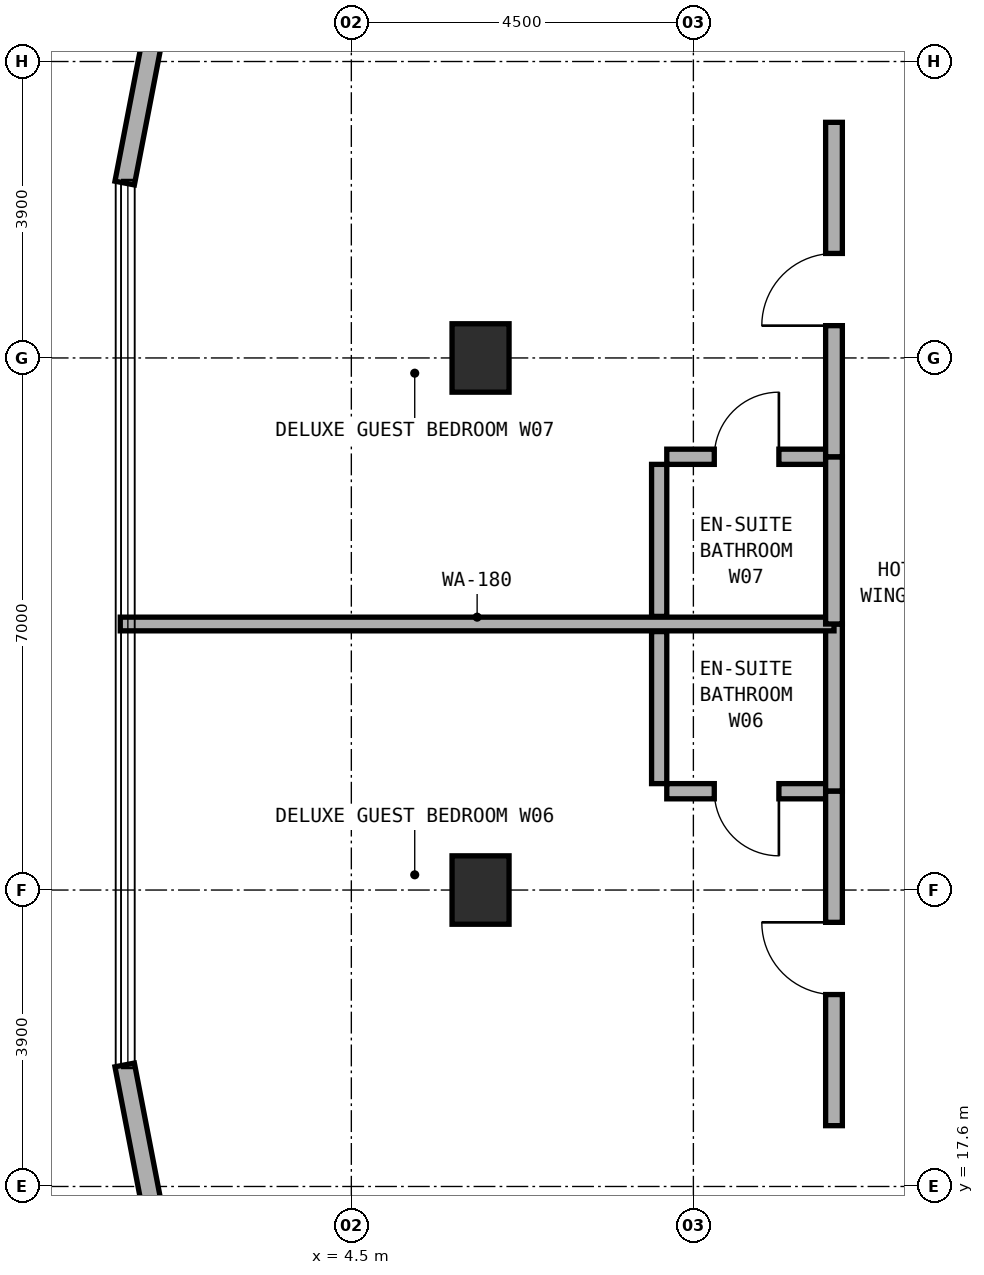
"""IFC4 building model, lengths in metres.
Left out: names, types, materials, properties, quantities, classifications, styles, units other than length and angle.
Written with IfcOpenShell. Run it as: python <this file> out.ifc"""

import sys

from ifc_helpers import new_model, si_unit, direction, frame, frame_2d, origin, origin_2d, place, context, subcontext, project, spatial, rectangle, extrude, element, fill, save


model = new_model("IFC4")
c1 = context("Model", 3, precision=1e-05, world=origin(), true_north=direction((0.0, 1.0)))
c2 = subcontext(c1, "Body", "Model", "MODEL_VIEW")
j1 = project(units=[si_unit("LENGTHUNIT", "METRE"), si_unit("PLANEANGLEUNIT", "RADIAN")], contexts=[c1])
p1 = place(None, origin())
s1 = spatial("IfcSite", under=j1, at=p1, CompositionType="ELEMENT")
p2 = place(p1, origin())
s2 = spatial("IfcBuilding", under=s1, at=p2, CompositionType="ELEMENT")
p3 = place(p2, frame((0.0, 0.0, 191.9)))
s3 = spatial("IfcBuildingStorey", under=s2, at=p3, CompositionType="ELEMENT", Elevation=191.9)
for number, where, z_axis, x_axis in (
    (1, (6.2, 21.5, 0.0), (0.0, 0.0, 1.0), (1.0, 0.0, 0.0)),
    (2, (6.2, 28.5, 0.0), (0.0, 0.0, 1.0), (1.0, 0.0, 0.0)),
):
    element("IfcColumn", number, at=place(p3, frame(where, z_axis=z_axis, x_axis=x_axis)), inside=s3, PredefinedType="COLUMN", context=c2, shape_type="SweptSolid", body=[
        extrude(rectangle(XDim=0.75, YDim=0.9, at=origin_2d()), origin(), (0.0, 0.0, 1.0), 3.6),
    ])
p4 = place(p3, frame((3.23, 39.683, 0.0), z_axis=(0.0, 0.0, 1.0), x_axis=(-0.189254809039, -0.98192801022, 0.0)))
e3 = element("IfcWall", 3, at=p4, inside=s3, PredefinedType="STANDARD", context=c2, shape_type="SweptSolid", body=[
    extrude(rectangle(XDim=9.046, YDim=0.26, at=frame_2d((4.523, 0.0))), origin(), (0.0, 0.0, 1.0), 3.32),
])
p5 = place(p4, frame((4.212, 0.0, 0.85)))
e4 = element("IfcOpeningElement", 4, at=p5, cuts=e3, PredefinedType="OPENING", context=c2, shape_type="SweptSolid", body=[
    extrude(rectangle(XDim=2.1, YDim=1.5, at=frame_2d((1.05, 0.75))), frame((0.0, 0.14, 0.0), z_axis=(0.0, -1.0, 0.0), x_axis=(1.0, 0.0, 0.0)), (0.0, 0.0, 1.0), 0.28),
])
p6 = place(p3, frame((1.518, 19.199, 0.0), z_axis=(0.0, 0.0, 1.0), x_axis=(0.189254809039, -0.98192801022, 0.0)))
e5 = element("IfcWall", 5, at=p6, inside=s3, PredefinedType="STANDARD", context=c2, shape_type="SweptSolid", body=[
    extrude(rectangle(XDim=9.046, YDim=0.26, at=frame_2d((4.523, 0.0))), origin(), (0.0, 0.0, 1.0), 3.32),
])
p7 = place(p6, frame((2.733, 0.0, 0.85)))
e6 = element("IfcOpeningElement", 6, at=p7, cuts=e5, PredefinedType="OPENING", context=c2, shape_type="SweptSolid", body=[
    extrude(rectangle(XDim=2.1, YDim=1.5, at=frame_2d((1.05, 0.75))), frame((0.0, 0.14, 0.0), z_axis=(0.0, -1.0, 0.0), x_axis=(1.0, 0.0, 0.0)), (0.0, 0.0, 1.0), 0.28),
])
p8 = place(p3, frame((8.65, 22.8, 0.0), z_axis=(0.0, 0.0, 1.0), x_axis=(1.0, 0.0, 0.0)))
e7 = element("IfcWall", 7, at=p8, inside=s3, PredefinedType="PLUMBINGWALL", context=c2, shape_type="SweptSolid", body=[
    extrude(rectangle(XDim=2.1, YDim=0.2, at=frame_2d((1.05, 0.0))), origin(), (0.0, 0.0, 1.0), 3.32),
])
p9 = place(p8, frame((0.625, 0.0, 0.0)))
e8 = element("IfcOpeningElement", 8, at=p9, cuts=e7, PredefinedType="OPENING", context=c2, shape_type="SweptSolid", body=[
    extrude(rectangle(XDim=0.85, YDim=2.1, at=frame_2d((0.425, 1.05))), frame((0.0, 0.11, 0.0), z_axis=(0.0, -1.0, 0.0), x_axis=(1.0, 0.0, 0.0)), (0.0, 0.0, 1.0), 0.22),
])
p10 = place(p3, frame((8.55, 22.9, 0.0), z_axis=(0.0, 0.0, 1.0), x_axis=(0.0, 1.0, 0.0)))
e9 = element("IfcWall", 9, at=p10, inside=s3, PredefinedType="PLUMBINGWALL", context=c2, shape_type="SweptSolid", body=[
    extrude(rectangle(XDim=2.0, YDim=0.2, at=frame_2d((1.0, 0.0))), origin(), (0.0, 0.0, 1.0), 3.32),
])
p11 = place(p3, frame((10.85, 22.8, 0.0), z_axis=(0.0, 0.0, 1.0), x_axis=(0.0, 1.0, 0.0)))
e10 = element("IfcWall", 10, at=p11, inside=s3, PredefinedType="SOLIDWALL", context=c2, shape_type="SweptSolid", body=[
    extrude(rectangle(XDim=2.2, YDim=0.22, at=frame_2d((1.1, 0.0))), origin(), (0.0, 0.0, 1.0), 3.32),
])
p12 = place(p3, frame((10.85, 18.4, 0.0), z_axis=(0.0, 0.0, 1.0), x_axis=(0.0, 1.0, 0.0)))
e11 = element("IfcWall", 11, at=p12, inside=s3, PredefinedType="SOLIDWALL", context=c2, shape_type="SweptSolid", body=[
    extrude(rectangle(XDim=4.4, YDim=0.22, at=frame_2d((2.2, 0.0))), origin(), (0.0, 0.0, 1.0), 2.995),
])
p13 = place(p12, frame((1.725, 0.0, 0.0)))
e12 = element("IfcOpeningElement", 12, at=p13, cuts=e11, PredefinedType="OPENING", context=c2, shape_type="SweptSolid", body=[
    extrude(rectangle(XDim=0.95, YDim=2.1, at=frame_2d((0.475, 1.05))), frame((0.0, 0.12, 0.0), z_axis=(0.0, -1.0, 0.0), x_axis=(1.0, 0.0, 0.0)), (0.0, 0.0, 1.0), 0.24),
])
p14 = place(p3, frame((1.46, 25.0, 0.0), z_axis=(0.0, 0.0, 1.0), x_axis=(1.0, 0.0, 0.0)))
e13 = element("IfcWall", 13, at=p14, inside=s3, PredefinedType="SOLIDWALL", context=c2, shape_type="SweptSolid", body=[
    extrude(rectangle(XDim=9.39, YDim=0.18, at=frame_2d((4.695, 0.0))), origin(), (0.0, 0.0, 1.0), 2.935),
])
p15 = place(p3, frame((8.65, 27.2, 0.0), z_axis=(0.0, 0.0, 1.0), x_axis=(1.0, 0.0, 0.0)))
e14 = element("IfcWall", 14, at=p15, inside=s3, PredefinedType="PLUMBINGWALL", context=c2, shape_type="SweptSolid", body=[
    extrude(rectangle(XDim=2.1, YDim=0.2, at=frame_2d((1.05, 0.0))), origin(), (0.0, 0.0, 1.0), 3.32),
])
p16 = place(p15, frame((0.625, 0.0, 0.0)))
e15 = element("IfcOpeningElement", 15, at=p16, cuts=e14, PredefinedType="OPENING", context=c2, shape_type="SweptSolid", body=[
    extrude(rectangle(XDim=0.85, YDim=2.1, at=frame_2d((0.425, 1.05))), frame((0.0, 0.11, 0.0), z_axis=(0.0, -1.0, 0.0), x_axis=(1.0, 0.0, 0.0)), (0.0, 0.0, 1.0), 0.22),
])
p17 = place(p3, frame((8.55, 25.1, 0.0), z_axis=(0.0, 0.0, 1.0), x_axis=(0.0, 1.0, 0.0)))
e16 = element("IfcWall", 16, at=p17, inside=s3, PredefinedType="PLUMBINGWALL", context=c2, shape_type="SweptSolid", body=[
    extrude(rectangle(XDim=2.0, YDim=0.2, at=frame_2d((1.0, 0.0))), origin(), (0.0, 0.0, 1.0), 3.32),
])
p18 = place(p3, frame((10.85, 25.0, 0.0), z_axis=(0.0, 0.0, 1.0), x_axis=(0.0, 1.0, 0.0)))
e17 = element("IfcWall", 17, at=p18, inside=s3, PredefinedType="SOLIDWALL", context=c2, shape_type="SweptSolid", body=[
    extrude(rectangle(XDim=2.2, YDim=0.22, at=frame_2d((1.1, 0.0))), origin(), (0.0, 0.0, 1.0), 3.32),
])
p19 = place(p3, frame((10.85, 27.2, 0.0), z_axis=(0.0, 0.0, 1.0), x_axis=(0.0, 1.0, 0.0)))
e18 = element("IfcWall", 18, at=p19, inside=s3, PredefinedType="SOLIDWALL", context=c2, shape_type="SweptSolid", body=[
    extrude(rectangle(XDim=4.4, YDim=0.22, at=frame_2d((2.2, 0.0))), origin(), (0.0, 0.0, 1.0), 2.995),
])
p20 = place(p19, frame((1.725, 0.0, 0.0)))
e19 = element("IfcOpeningElement", 19, at=p20, cuts=e18, PredefinedType="OPENING", context=c2, shape_type="SweptSolid", body=[
    extrude(rectangle(XDim=0.95, YDim=2.1, at=frame_2d((0.475, 1.05))), frame((0.0, 0.12, 0.0), z_axis=(0.0, -1.0, 0.0), x_axis=(1.0, 0.0, 0.0)), (0.0, 0.0, 1.0), 0.24),
])
p21 = place(p9, frame((0.85, 0.0, 0.0), z_axis=(0.0, 0.0, 1.0), x_axis=(-1.0, 0.0, 0.0)))
e20 = element("IfcDoor", 20, at=p21, inside=s3, OperationType="SINGLE_SWING_LEFT", PredefinedType="DOOR", context=c2, shape_type="SweptSolid", body=[
    extrude(rectangle(XDim=0.85, YDim=2.1, at=frame_2d((0.425, 1.05))), frame((0.0, 0.025, 0.0), z_axis=(0.0, -1.0, 0.0), x_axis=(1.0, 0.0, 0.0)), (0.0, 0.0, 1.0), 0.05),
])
fill(e8, e20)
p22 = place(p13, origin())
e21 = element("IfcDoor", 21, at=p22, inside=s3, OperationType="SINGLE_SWING_RIGHT", PredefinedType="DOOR", context=c2, shape_type="SweptSolid", body=[
    extrude(rectangle(XDim=0.95, YDim=2.1, at=frame_2d((0.475, 1.05))), frame((0.0, 0.025, 0.0), z_axis=(0.0, -1.0, 0.0), x_axis=(1.0, 0.0, 0.0)), (0.0, 0.0, 1.0), 0.05),
])
fill(e12, e21)
p23 = place(p16, origin())
e22 = element("IfcDoor", 22, at=p23, inside=s3, OperationType="SINGLE_SWING_RIGHT", PredefinedType="DOOR", context=c2, shape_type="SweptSolid", body=[
    extrude(rectangle(XDim=0.85, YDim=2.1, at=frame_2d((0.425, 1.05))), frame((0.0, 0.025, 0.0), z_axis=(0.0, -1.0, 0.0), x_axis=(1.0, 0.0, 0.0)), (0.0, 0.0, 1.0), 0.05),
])
fill(e15, e22)
p24 = place(p20, origin())
e23 = element("IfcDoor", 23, at=p24, inside=s3, OperationType="SINGLE_SWING_LEFT", PredefinedType="DOOR", context=c2, shape_type="SweptSolid", body=[
    extrude(rectangle(XDim=0.95, YDim=2.1, at=frame_2d((0.475, 1.05))), frame((0.0, 0.025, 0.0), z_axis=(0.0, -1.0, 0.0), x_axis=(1.0, 0.0, 0.0)), (0.0, 0.0, 1.0), 0.05),
])
fill(e19, e23)
save(model, sys.argv[1])
